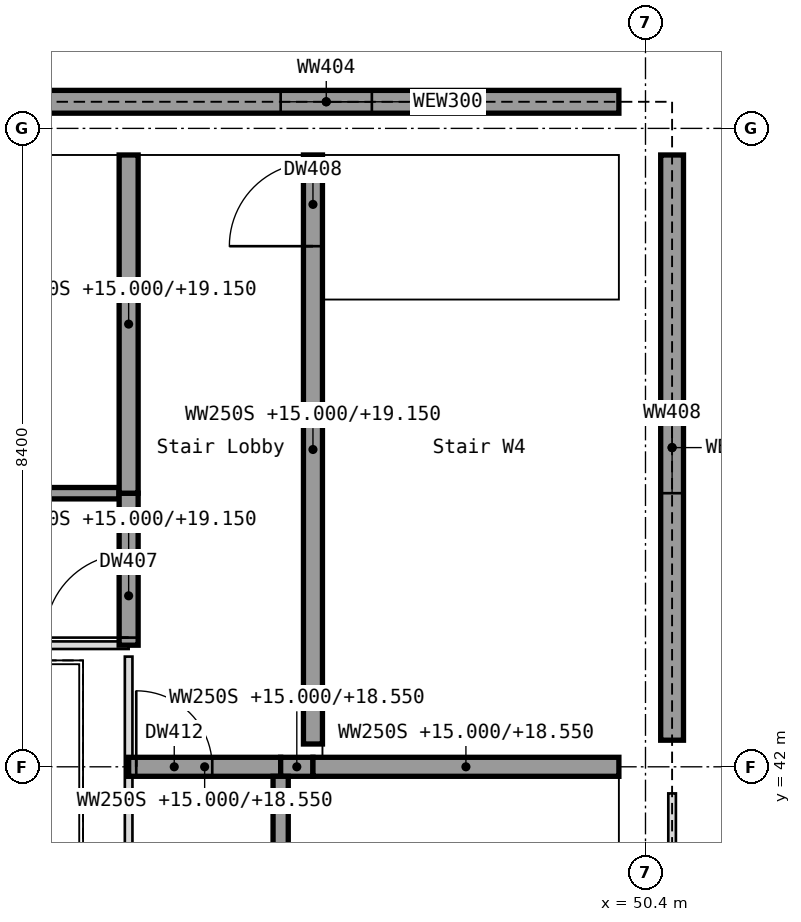
"""IFC4 building model, lengths in metres.
Left out: names, types, materials, properties, quantities, classifications, styles, units other than length and angle.
Written with IfcOpenShell. Run it as: python <this file> out.ifc"""

import sys

from ifc_helpers import new_model, si_unit, direction, frame, frame_2d, origin, origin_2d, place, context, subcontext, project, spatial, rectangle, extrude, element, fill, save


model = new_model("IFC4")
c1 = context("Model", 3, precision=1e-05, world=origin(), true_north=direction((0.0, 1.0)))
c2 = subcontext(c1, "Body", "Model", "MODEL_VIEW")
j1 = project(units=[si_unit("LENGTHUNIT", "METRE"), si_unit("PLANEANGLEUNIT", "RADIAN")], contexts=[c1])
p1 = place(None, origin())
s1 = spatial("IfcSite", under=j1, at=p1, CompositionType="ELEMENT")
p2 = place(p1, origin())
s2 = spatial("IfcBuilding", under=s1, at=p2, CompositionType="ELEMENT")
p3 = place(p2, frame((0.0, 0.0, 15.0)))
s3 = spatial("IfcBuildingStorey", under=s2, at=p3, CompositionType="ELEMENT", Elevation=15.0)
for number, where, z_axis, x_axis in (
    (1, (50.4, 42.0, 0.0), (0.0, 0.0, 1.0), (1.0, 0.0, 0.0)),
    (2, (50.4, 50.4, 0.0), (0.0, 0.0, 1.0), (1.0, 0.0, 0.0)),
):
    element("IfcColumn", number, at=place(p3, frame(where, z_axis=z_axis, x_axis=x_axis)), inside=s3, PredefinedType="COLUMN", context=c2, shape_type="SweptSolid", body=[
        extrude(rectangle(XDim=0.7, YDim=0.7, at=origin_2d()), origin(), (0.0, 0.0, 1.0), 4.5),
    ])
p4 = place(p3, frame((42.35, 50.75, 0.0), z_axis=(0.0, 0.0, 1.0), x_axis=(1.0, 0.0, 0.0)))
e3 = element("IfcWall", 3, at=p4, inside=s3, PredefinedType="SOLIDWALL", context=c2, shape_type="SweptSolid", body=[
    extrude(rectangle(XDim=7.7, YDim=0.3, at=frame_2d((3.85, 0.0))), origin(), (0.0, 0.0, 1.0), 3.8),
])
p5 = place(p4, frame((3.25, 0.0, 1.0)))
e4 = element("IfcOpeningElement", 4, at=p5, cuts=e3, PredefinedType="OPENING", context=c2, shape_type="SweptSolid", body=[
    extrude(rectangle(XDim=1.2, YDim=1.5, at=frame_2d((0.6, 0.75))), frame((0.0, 0.15, 0.0), z_axis=(0.0, -1.0, 0.0), x_axis=(1.0, 0.0, 0.0)), (0.0, 0.0, 1.0), 0.3),
])
p6 = place(p3, frame((50.75, 42.35, 0.0), z_axis=(0.0, 0.0, 1.0), x_axis=(0.0, 1.0, 0.0)))
e5 = element("IfcWall", 5, at=p6, inside=s3, PredefinedType="SOLIDWALL", context=c2, shape_type="SweptSolid", body=[
    extrude(rectangle(XDim=7.7, YDim=0.3, at=frame_2d((3.85, 0.0))), origin(), (0.0, 0.0, 1.0), 3.8),
])
p7 = place(p6, frame((3.25, 0.0, 1.0)))
e6 = element("IfcOpeningElement", 6, at=p7, cuts=e5, PredefinedType="OPENING", context=c2, shape_type="SweptSolid", body=[
    extrude(rectangle(XDim=1.2, YDim=1.5, at=frame_2d((0.6, 0.75))), frame((0.0, 0.15, 0.0), z_axis=(0.0, -1.0, 0.0), x_axis=(1.0, 0.0, 0.0)), (0.0, 0.0, 1.0), 0.3),
])
p8 = place(p3, frame((43.6, 42.0, 0.0), z_axis=(0.0, 0.0, 1.0), x_axis=(1.0, 0.0, 0.0)))
e7 = element("IfcWall", 7, at=p8, inside=s3, PredefinedType="SHEAR", context=c2, shape_type="SweptSolid", body=[
    extrude(rectangle(XDim=2.0, YDim=0.25, at=frame_2d((1.0, 0.0))), origin(), (0.0, 0.0, 1.0), 3.55),
])
p9 = place(p8, frame((0.1, 0.0, 0.0)))
e8 = element("IfcOpeningElement", 8, at=p9, cuts=e7, PredefinedType="OPENING", context=c2, shape_type="SweptSolid", body=[
    extrude(rectangle(XDim=1.0, YDim=2.1, at=frame_2d((0.5, 1.05))), frame((0.0, 0.125, 0.0), z_axis=(0.0, -1.0, 0.0), x_axis=(1.0, 0.0, 0.0)), (0.0, 0.0, 1.0), 0.25),
])
p10 = place(p3, frame((45.6, 42.0, 0.0), z_axis=(0.0, 0.0, 1.0), x_axis=(1.0, 0.0, 0.0)))
e9 = element("IfcWall", 9, at=p10, inside=s3, PredefinedType="SHEAR", context=c2, shape_type="SweptSolid", body=[
    extrude(rectangle(XDim=0.425, YDim=0.25, at=frame_2d((0.212, 0.0))), origin(), (0.0, 0.0, 1.0), 3.55),
])
p11 = place(p3, frame((46.025, 42.0, 0.0), z_axis=(0.0, 0.0, 1.0), x_axis=(1.0, 0.0, 0.0)))
e10 = element("IfcWall", 10, at=p11, inside=s3, PredefinedType="SHEAR", context=c2, shape_type="SweptSolid", body=[
    extrude(rectangle(XDim=4.025, YDim=0.25, at=frame_2d((2.013, 0.0))), origin(), (0.0, 0.0, 1.0), 3.55),
])
p12 = place(p3, frame((33.6, 45.6, 0.0), z_axis=(0.0, 0.0, 1.0), x_axis=(1.0, 0.0, 0.0)))
e11 = element("IfcWall", 11, at=p12, inside=s3, PredefinedType="PARTITIONING", context=c2, shape_type="SweptSolid", body=[
    extrude(rectangle(XDim=9.875, YDim=0.15, at=frame_2d((4.938, 0.0))), origin(), (0.0, 0.0, 1.0), 3.55),
])
p13 = place(p12, frame((4.438, 0.0, 0.0)))
e12 = element("IfcOpeningElement", 12, at=p13, cuts=e11, PredefinedType="OPENING", context=c2, shape_type="SweptSolid", body=[
    extrude(rectangle(XDim=1.0, YDim=2.1, at=frame_2d((0.5, 1.05))), frame((0.0, 0.075, 0.0), z_axis=(0.0, -1.0, 0.0), x_axis=(1.0, 0.0, 0.0)), (0.0, 0.0, 1.0), 0.15),
])
p14 = place(p3, frame((43.6, 43.6, 0.0), z_axis=(0.0, 0.0, 1.0), x_axis=(0.0, 1.0, 0.0)))
e13 = element("IfcWall", 13, at=p14, inside=s3, PredefinedType="SHEAR", context=c2, shape_type="SweptSolid", body=[
    extrude(rectangle(XDim=2.0, YDim=0.25, at=frame_2d((1.0, 0.0))), origin(), (0.0, 0.0, 1.0), 4.15),
])
p15 = place(p14, frame((0.1, 0.0, 0.0)))
e14 = element("IfcOpeningElement", 14, at=p15, cuts=e13, PredefinedType="OPENING", context=c2, shape_type="SweptSolid", body=[
    extrude(rectangle(XDim=1.1, YDim=2.1, at=frame_2d((0.55, 1.05))), frame((0.0, 0.125, 0.0), z_axis=(0.0, -1.0, 0.0), x_axis=(1.0, 0.0, 0.0)), (0.0, 0.0, 1.0), 0.25),
])
p16 = place(p3, frame((43.6, 45.6, 0.0), z_axis=(0.0, 0.0, 1.0), x_axis=(0.0, 1.0, 0.0)))
e15 = element("IfcWall", 15, at=p16, inside=s3, PredefinedType="SHEAR", context=c2, shape_type="SweptSolid", body=[
    extrude(rectangle(XDim=4.45, YDim=0.25, at=frame_2d((2.225, 0.0))), origin(), (0.0, 0.0, 1.0), 4.15),
])
p17 = place(p3, frame((45.6, 33.6, 0.0), z_axis=(0.0, 0.0, 1.0), x_axis=(0.0, 1.0, 0.0)))
e16 = element("IfcWall", 16, at=p17, inside=s3, PredefinedType="PARTITIONING", context=c2, shape_type="SweptSolid", body=[
    extrude(rectangle(XDim=8.275, YDim=0.2, at=frame_2d((4.137, 0.0))), origin(), (0.0, 0.0, 1.0), 3.55),
])
p18 = place(p17, frame((3.637, 0.0, 0.0)))
e17 = element("IfcOpeningElement", 17, at=p18, cuts=e16, PredefinedType="OPENING", context=c2, shape_type="SweptSolid", body=[
    extrude(rectangle(XDim=1.0, YDim=2.1, at=frame_2d((0.5, 1.05))), frame((0.0, 0.1, 0.0), z_axis=(0.0, -1.0, 0.0), x_axis=(1.0, 0.0, 0.0)), (0.0, 0.0, 1.0), 0.2),
])
p19 = place(p3, frame((46.025, 42.3, 0.0), z_axis=(0.0, 0.0, 1.0), x_axis=(0.0, 1.0, 0.0)))
e18 = element("IfcWall", 18, at=p19, inside=s3, PredefinedType="SHEAR", context=c2, shape_type="SweptSolid", body=[
    extrude(rectangle(XDim=7.75, YDim=0.25, at=frame_2d((3.875, 0.0))), origin(), (0.0, 0.0, 1.0), 4.15),
])
p20 = place(p19, frame((6.55, 0.0, 0.0)))
e19 = element("IfcOpeningElement", 19, at=p20, cuts=e18, PredefinedType="OPENING", context=c2, shape_type="SweptSolid", body=[
    extrude(rectangle(XDim=1.1, YDim=2.1, at=frame_2d((0.55, 1.05))), frame((0.0, 0.125, 0.0), z_axis=(0.0, -1.0, 0.0), x_axis=(1.0, 0.0, 0.0)), (0.0, 0.0, 1.0), 0.25),
])
p21 = place(p5, origin())
e20 = element("IfcWindow", 20, at=p21, inside=s3, PartitioningType="SINGLE_PANEL", PredefinedType="WINDOW", context=c2, shape_type="SweptSolid", body=[
    extrude(rectangle(XDim=1.2, YDim=1.5, at=frame_2d((0.6, 0.75))), frame((0.0, 0.03, 0.0), z_axis=(0.0, -1.0, 0.0), x_axis=(1.0, 0.0, 0.0)), (0.0, 0.0, 1.0), 0.06),
])
fill(e4, e20)
p22 = place(p7, origin())
e21 = element("IfcWindow", 21, at=p22, inside=s3, PartitioningType="SINGLE_PANEL", PredefinedType="WINDOW", context=c2, shape_type="SweptSolid", body=[
    extrude(rectangle(XDim=1.2, YDim=1.5, at=frame_2d((0.6, 0.75))), frame((0.0, 0.03, 0.0), z_axis=(0.0, -1.0, 0.0), x_axis=(1.0, 0.0, 0.0)), (0.0, 0.0, 1.0), 0.06),
])
fill(e6, e21)
p23 = place(p15, origin())
e22 = element("IfcDoor", 22, at=p23, inside=s3, OperationType="SINGLE_SWING_LEFT", PredefinedType="DOOR", context=c2, shape_type="SweptSolid", body=[
    extrude(rectangle(XDim=1.1, YDim=2.1, at=frame_2d((0.55, 1.05))), frame((0.0, 0.025, 0.0), z_axis=(0.0, -1.0, 0.0), x_axis=(1.0, 0.0, 0.0)), (0.0, 0.0, 1.0), 0.05),
])
fill(e14, e22)
p24 = place(p20, origin())
e23 = element("IfcDoor", 23, at=p24, inside=s3, OperationType="SINGLE_SWING_RIGHT", PredefinedType="DOOR", context=c2, shape_type="SweptSolid", body=[
    extrude(rectangle(XDim=1.1, YDim=2.1, at=frame_2d((0.55, 1.05))), frame((0.0, 0.025, 0.0), z_axis=(0.0, -1.0, 0.0), x_axis=(1.0, 0.0, 0.0)), (0.0, 0.0, 1.0), 0.05),
])
fill(e19, e23)
p25 = place(p9, origin())
e24 = element("IfcDoor", 24, at=p25, inside=s3, OperationType="SINGLE_SWING_LEFT", PredefinedType="DOOR", context=c2, shape_type="SweptSolid", body=[
    extrude(rectangle(XDim=1.0, YDim=2.1, at=frame_2d((0.5, 1.05))), frame((0.0, 0.025, 0.0), z_axis=(0.0, -1.0, 0.0), x_axis=(1.0, 0.0, 0.0)), (0.0, 0.0, 1.0), 0.05),
])
fill(e8, e24)
save(model, sys.argv[1])
